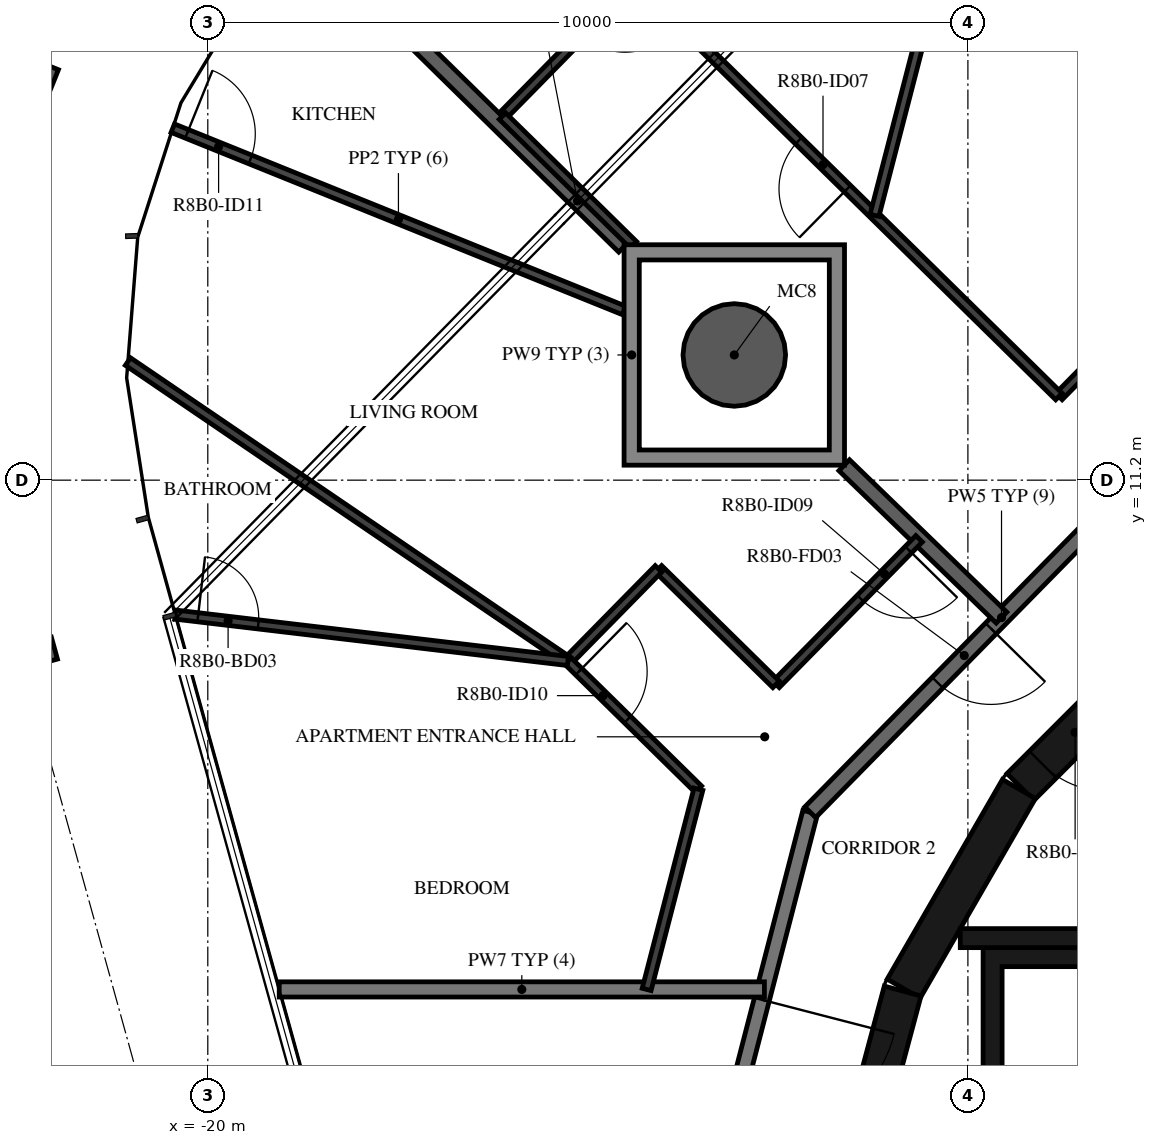
"""IFC4 building model, lengths in metres.
Left out: names, types, materials, properties, quantities, classifications, styles, units other than length and angle.
Written with IfcOpenShell. Run it as: python <this file> out.ifc"""

import sys

from ifc_helpers import new_model, si_unit, direction, frame, frame_2d, origin, origin_2d, place, context, subcontext, project, spatial, polyline, rectangle, hollow_circle, i_section, outline, extrude, element, fill, save


model = new_model("IFC4")
c1 = context("Model", 3, precision=1e-05, world=origin(), true_north=direction((0.0, 1.0)))
c2 = subcontext(c1, "Body", "Model", "MODEL_VIEW")
j1 = project(units=[si_unit("LENGTHUNIT", "METRE"), si_unit("PLANEANGLEUNIT", "RADIAN")], contexts=[c1])
p1 = place(None, origin())
s1 = spatial("IfcSite", under=j1, at=p1, CompositionType="ELEMENT")
p2 = place(p1, origin())
s2 = spatial("IfcBuilding", under=s1, at=p2, CompositionType="ELEMENT")
p3 = place(p2, frame((0.0, 0.0, 312.2)))
s3 = spatial("IfcBuildingStorey", under=s2, at=p3, CompositionType="ELEMENT", Elevation=312.2)
p4 = place(p3, frame((-13.073, 12.847, -0.38), z_axis=(0.0, 0.0, 1.0), x_axis=(1.0, 0.0, 0.0)))
e1 = element("IfcColumn", 1, at=p4, inside=s3, PredefinedType="COLUMN", context=c2, shape_type="SweptSolid", body=[
    extrude(hollow_circle(Radius=0.675, WallThickness=0.03, at=origin_2d()), origin(), (0.0, 0.0, 1.0), 3.5),
])
for number, where, z_axis, x_axis in (
    (2, (-22.438, 16.629, -0.38), (0.0, 0.0, 1.0), (0.374, 0.927, 0.0)),
    (3, (-22.452, 8.87, -0.38), (0.0, 0.0, 1.0), (-0.267, 0.964, 0.0)),
):
    element("IfcColumn", number, at=place(p3, frame(where, z_axis=z_axis, x_axis=x_axis)), inside=s3, PredefinedType="COLUMN", context=c2, shape_type="SweptSolid", body=[
        extrude(i_section(OverallWidth=0.3, OverallDepth=0.9, WebThickness=0.019, FlangeThickness=0.035, FilletRadius=0.03, at=origin_2d()), origin(), (0.0, 0.0, 1.0), 3.5),
    ])
p5 = place(p3, frame((-7.164, 9.308, 0.0), z_axis=(0.0, 0.0, 1.0), x_axis=(-0.707106781187, -0.707106781187, 0.0)))
e4 = element("IfcWall", 4, at=p5, inside=s3, PredefinedType="SHEAR", context=c2, shape_type="SweptSolid", body=[
    extrude(rectangle(XDim=3.032, YDim=0.5, at=frame_2d((1.516, 0.0))), origin(), (0.0, 0.0, 1.0), 3.12),
])
p6 = place(p5, frame((1.416, 0.0, 0.0)))
e5 = element("IfcOpeningElement", 5, at=p6, cuts=e4, PredefinedType="OPENING", context=c2, shape_type="SweptSolid", body=[
    extrude(rectangle(XDim=1.2, YDim=2.1, at=frame_2d((0.6, 1.05))), frame((0.0, 0.26, 0.0), z_axis=(0.0, -1.0, 0.0), x_axis=(1.0, 0.0, 0.0)), (0.0, 0.0, 1.0), 0.52),
])
for number, where, z_axis, x_axis in (
    (6, (-9.329, 7.137, 0.0), (0.0, 0.0, 1.0), (-0.5, -0.866, 0.0)),
    (7, (-10.858, 4.479, 0.0), (0.0, 0.0, 1.0), (-0.259, -0.966, 0.0)),
):
    element("IfcWall", number, at=place(p3, frame(where, z_axis=z_axis, x_axis=x_axis)), inside=s3, PredefinedType="SHEAR", context=c2, shape_type="SweptSolid", body=[
        extrude(rectangle(XDim=3.033, YDim=0.5, at=frame_2d((1.516, 0.0))), origin(), (0.0, 0.0, 1.0), 3.12),
    ])
p7 = place(p3, frame((-7.0, 5.175, 0.0), z_axis=(0.0, 0.0, 1.0), x_axis=(-1.0, 0.0, 0.0)))
e8 = element("IfcWall", 8, at=p7, inside=s3, PredefinedType="SHEAR", context=c2, shape_type="SweptSolid", body=[
    extrude(rectangle(XDim=3.1, YDim=0.25, at=frame_2d((1.55, 0.0))), origin(), (0.0, 0.0, 1.0), 3.12),
])
p8 = place(p3, origin())
e9 = element("IfcWall", 9, at=p8, inside=s3, PredefinedType="SHEAR", context=c2, shape_type="SweptSolid", body=[
    extrude(outline(polyline([(-9.8, 1.9), (-9.55, 1.9), (-9.55, 4.8), (3.1, 4.8), (3.1, 1.9), (3.35, 1.9), (3.35, 4.8), (5.25, 4.8), (5.25, 1.9), (5.5, 1.9), (5.5, 4.8), (7.4, 4.8), (7.4, 1.9), (7.65, 1.9), (7.65, 4.8), (9.55, 4.8), (9.55, 1.9), (9.8, 1.9), (9.8, 4.8), (9.8, 5.05), (-9.8, 5.05), (-9.8, 4.8), (-9.8, 1.9)])), origin(), (0.0, 0.0, 1.0), 3.12),
])
p9 = place(p3, frame((-12.074, 6.831, 0.0), z_axis=(0.0, 0.0, 1.0), x_axis=(-0.250391063186, -0.968144780225, 0.0)))
e10 = element("IfcWall", 10, at=p9, inside=s3, PredefinedType="STANDARD", context=c2, shape_type="SweptSolid", body=[
    extrude(rectangle(XDim=7.181, YDim=0.2, at=frame_2d((3.591, 0.0))), origin(), (0.0, 0.0, 1.0), 3.12),
])
p10 = place(p9, frame((2.548, 0.0, 0.0)))
e11 = element("IfcOpeningElement", 11, at=p10, cuts=e10, PredefinedType="OPENING", context=c2, shape_type="SweptSolid", body=[
    extrude(rectangle(XDim=1.8, YDim=2.1, at=frame_2d((0.9, 1.05))), frame((0.0, 0.11, 0.0), z_axis=(0.0, -1.0, 0.0), x_axis=(1.0, 0.0, 0.0)), (0.0, 0.0, 1.0), 0.22),
])
p11 = place(p3, frame((-7.041, 11.953, 0.0), z_axis=(0.0, 0.0, 1.0), x_axis=(-0.70090916255, -0.713250549143, 0.0)))
e12 = element("IfcWall", 12, at=p11, inside=s3, PredefinedType="STANDARD", context=c2, shape_type="SweptSolid", body=[
    extrude(rectangle(XDim=7.181, YDim=0.2, at=frame_2d((3.59, 0.0))), origin(), (0.0, 0.0, 1.0), 3.12),
])
p12 = place(p11, frame((3.791, 0.0, 0.0)))
e13 = element("IfcOpeningElement", 13, at=p12, cuts=e12, PredefinedType="OPENING", context=c2, shape_type="SweptSolid", body=[
    extrude(rectangle(XDim=1.0, YDim=2.1, at=frame_2d((0.5, 1.05))), frame((0.0, 0.11, 0.0), z_axis=(0.0, -1.0, 0.0), x_axis=(1.0, 0.0, 0.0)), (0.0, 0.0, 1.0), 0.22),
])
p13 = place(p3, frame((-12.677, 4.5, 0.0), z_axis=(0.0, 0.0, 1.0), x_axis=(-1.0, 0.0, 0.0)))
e14 = element("IfcWall", 14, at=p13, inside=s3, PredefinedType="STANDARD", context=c2, shape_type="SweptSolid", body=[
    extrude(rectangle(XDim=6.383, YDim=0.2, at=frame_2d((3.192, 0.0))), origin(), (0.0, 0.0, 1.0), 3.12),
])
p14 = place(p3, frame((-11.627, 11.396, 0.0), z_axis=(0.0, 0.0, 1.0), x_axis=(0.718328882961, -0.695703683981, 0.0)))
e15 = element("IfcWall", 15, at=p14, inside=s3, PredefinedType="STANDARD", context=c2, shape_type="SweptSolid", body=[
    extrude(rectangle(XDim=2.881, YDim=0.2, at=frame_2d((1.44, 0.0))), origin(), (0.0, 0.0, 1.0), 3.12),
])
p15 = place(p3, frame((-18.741, 18.417, 0.0), z_axis=(0.0, 0.0, 1.0), x_axis=(0.713252414586, -0.700907264256, 0.0)))
e16 = element("IfcWall", 16, at=p15, inside=s3, PredefinedType="STANDARD", context=c2, shape_type="SweptSolid", body=[
    extrude(rectangle(XDim=5.913, YDim=0.2, at=frame_2d((2.957, 0.0))), origin(), (0.0, 0.0, 1.0), 3.12),
])
p16 = place(p3, frame((-7.829, 13.291, 0.0), z_axis=(0.0, 0.0, 1.0), x_axis=(-0.700840583087, -0.713317935494, 0.0)))
e17 = element("IfcWall", 17, at=p16, inside=s3, PredefinedType="PARTITIONING", context=c2, shape_type="SweptSolid", body=[
    extrude(rectangle(XDim=1.389, YDim=0.12, at=frame_2d((0.695, 0.0))), origin(), (0.0, 0.0, 1.0), 3.12),
])
p17 = place(p3, frame((-8.803, 12.3, 0.0), z_axis=(0.0, 0.0, 1.0), x_axis=(-0.713240430861, 0.700919458844, 0.0)))
e18 = element("IfcWall", 18, at=p17, inside=s3, PredefinedType="PARTITIONING", context=c2, shape_type="SweptSolid", body=[
    extrude(rectangle(XDim=7.807, YDim=0.12, at=frame_2d((3.904, 0.0))), origin(), (0.0, 0.0, 1.0), 3.12),
])
p18 = place(p17, frame((3.901, 0.0, 0.0)))
e19 = element("IfcOpeningElement", 19, at=p18, cuts=e18, PredefinedType="OPENING", context=c2, shape_type="SweptSolid", body=[
    extrude(rectangle(XDim=0.9, YDim=2.1, at=frame_2d((0.45, 1.05))), frame((0.0, 0.07, 0.0), z_axis=(0.0, -1.0, 0.0), x_axis=(1.0, 0.0, 0.0)), (0.0, 0.0, 1.0), 0.14),
])
p19 = place(p3, frame((-14.371, 17.772, 0.0), z_axis=(0.0, 0.0, 1.0), x_axis=(-0.700928101034, -0.713231937859, 0.0)))
e20 = element("IfcWall", 20, at=p19, inside=s3, PredefinedType="PARTITIONING", context=c2, shape_type="SweptSolid", body=[
    extrude(rectangle(XDim=2.5, YDim=0.12, at=frame_2d((1.25, 0.0))), origin(), (0.0, 0.0, 1.0), 3.12),
])
p20 = place(p19, frame((0.2, 0.0, 0.0)))
e21 = element("IfcOpeningElement", 21, at=p20, cuts=e20, PredefinedType="OPENING", context=c2, shape_type="SweptSolid", body=[
    extrude(rectangle(XDim=0.8, YDim=2.1, at=frame_2d((0.4, 1.05))), frame((0.0, 0.07, 0.0), z_axis=(0.0, -1.0, 0.0), x_axis=(1.0, 0.0, 0.0)), (0.0, 0.0, 1.0), 0.14),
])
p21 = place(p3, frame((-16.124, 15.989, 0.0), z_axis=(0.0, 0.0, 1.0), x_axis=(0.713298294795, -0.700860572898, 0.0)))
e22 = element("IfcWall", 22, at=p21, inside=s3, PredefinedType="PARTITIONING", context=c2, shape_type="SweptSolid", body=[
    extrude(rectangle(XDim=2.414, YDim=0.12, at=frame_2d((1.207, 0.0))), origin(), (0.0, 0.0, 1.0), 3.12),
])
p22 = place(p3, frame((-9.787, 20.26, 0.0), z_axis=(0.0, 0.0, 1.0), x_axis=(-0.250397207818, -0.968143191019, 0.0)))
e23 = element("IfcWall", 23, at=p22, inside=s3, PredefinedType="PARTITIONING", context=c2, shape_type="SweptSolid", body=[
    extrude(rectangle(XDim=5.76, YDim=0.12, at=frame_2d((2.88, 0.0))), origin(), (0.0, 0.0, 1.0), 2.73),
])
p23 = place(p22, frame((0.2, 0.0, 0.0)))
e24 = element("IfcOpeningElement", 24, at=p23, cuts=e23, PredefinedType="OPENING", context=c2, shape_type="SweptSolid", body=[
    extrude(rectangle(XDim=0.9, YDim=2.1, at=frame_2d((0.45, 1.05))), frame((0.0, 0.07, 0.0), z_axis=(0.0, -1.0, 0.0), x_axis=(1.0, 0.0, 0.0)), (0.0, 0.0, 1.0), 0.14),
])
p24 = place(p3, frame((-10.642, 10.429, 0.0), z_axis=(0.0, 0.0, 1.0), x_axis=(-0.700897237058, -0.713262268092, 0.0)))
e25 = element("IfcWall", 25, at=p24, inside=s3, PredefinedType="PARTITIONING", context=c2, shape_type="SweptSolid", body=[
    extrude(rectangle(XDim=2.685, YDim=0.12, at=frame_2d((1.343, 0.0))), origin(), (0.0, 0.0, 1.0), 3.12),
])
p25 = place(p24, frame((0.2, 0.0, 0.0)))
e26 = element("IfcOpeningElement", 26, at=p25, cuts=e25, PredefinedType="OPENING", context=c2, shape_type="SweptSolid", body=[
    extrude(rectangle(XDim=0.9, YDim=2.1, at=frame_2d((0.45, 1.05))), frame((0.0, 0.07, 0.0), z_axis=(0.0, -1.0, 0.0), x_axis=(1.0, 0.0, 0.0)), (0.0, 0.0, 1.0), 0.14),
])
p26 = place(p3, frame((-12.524, 8.513, 0.0), z_axis=(0.0, 0.0, 1.0), x_axis=(-0.713272241211, 0.700887087852, 0.0)))
e27 = element("IfcWall", 27, at=p26, inside=s3, PredefinedType="PARTITIONING", context=c2, shape_type="SweptSolid", body=[
    extrude(rectangle(XDim=2.168, YDim=0.12, at=frame_2d((1.084, 0.0))), origin(), (0.0, 0.0, 1.0), 3.12),
])
p27 = place(p3, frame((-14.071, 10.033, 0.0), z_axis=(0.0, 0.0, 1.0), x_axis=(-0.700903812832, -0.713255806255, 0.0)))
e28 = element("IfcWall", 28, at=p27, inside=s3, PredefinedType="PARTITIONING", context=c2, shape_type="SweptSolid", body=[
    extrude(rectangle(XDim=1.7, YDim=0.12, at=frame_2d((0.85, 0.0))), origin(), (0.0, 0.0, 1.0), 3.12),
])
p28 = place(p3, frame((-15.262, 8.821, 0.0), z_axis=(0.0, 0.0, 1.0), x_axis=(0.713216332019, -0.700943980459, 0.0)))
e29 = element("IfcWall", 29, at=p28, inside=s3, PredefinedType="PARTITIONING", context=c2, shape_type="SweptSolid", body=[
    extrude(rectangle(XDim=2.407, YDim=0.12, at=frame_2d((1.204, 0.0))), origin(), (0.0, 0.0, 1.0), 3.12),
])
p29 = place(p28, frame((0.2, 0.0, 0.0)))
e30 = element("IfcOpeningElement", 30, at=p29, cuts=e29, PredefinedType="OPENING", context=c2, shape_type="SweptSolid", body=[
    extrude(rectangle(XDim=0.9, YDim=2.1, at=frame_2d((0.45, 1.05))), frame((0.0, 0.07, 0.0), z_axis=(0.0, -1.0, 0.0), x_axis=(1.0, 0.0, 0.0)), (0.0, 0.0, 1.0), 0.14),
])
p30 = place(p3, frame((-13.545, 7.134, 0.0), z_axis=(0.0, 0.0, 1.0), x_axis=(-0.250320452157, -0.968163039592, 0.0)))
e31 = element("IfcWall", 31, at=p30, inside=s3, PredefinedType="PARTITIONING", context=c2, shape_type="SweptSolid", body=[
    extrude(rectangle(XDim=2.72, YDim=0.12, at=frame_2d((1.36, 0.0))), origin(), (0.0, 0.0, 1.0), 3.12),
])
p31 = place(p3, frame((-20.46, 15.831, 0.0), z_axis=(0.0, 0.0, 1.0), x_axis=(0.927230380144, -0.374491417977, 0.0)))
e32 = element("IfcWall", 32, at=p31, inside=s3, PredefinedType="PARTITIONING", context=c2, shape_type="SweptSolid", body=[
    extrude(rectangle(XDim=6.403, YDim=0.12, at=frame_2d((3.202, 0.0))), origin(), (0.0, 0.0, 1.0), 2.73),
])
p32 = place(p31, frame((0.2, 0.0, 0.0)))
e33 = element("IfcOpeningElement", 33, at=p32, cuts=e32, PredefinedType="OPENING", context=c2, shape_type="SweptSolid", body=[
    extrude(rectangle(XDim=0.9, YDim=2.1, at=frame_2d((0.45, 1.05))), frame((0.0, 0.07, 0.0), z_axis=(0.0, -1.0, 0.0), x_axis=(1.0, 0.0, 0.0)), (0.0, 0.0, 1.0), 0.14),
])
p33 = place(p3, frame((-21.051, 12.76, 0.0), z_axis=(0.0, 0.0, 1.0), x_axis=(0.826728647395, -0.562600874134, 0.0)))
e34 = element("IfcWall", 34, at=p33, inside=s3, PredefinedType="PARTITIONING", context=c2, shape_type="SweptSolid", body=[
    extrude(rectangle(XDim=7.002, YDim=0.12, at=frame_2d((3.501, 0.0))), origin(), (0.0, 0.0, 1.0), 3.12),
])
p34 = place(p3, frame((-20.428, 9.431, 0.0), z_axis=(0.0, 0.0, 1.0), x_axis=(0.993086702471, -0.117383139226, 0.0)))
e35 = element("IfcWall", 35, at=p34, inside=s3, PredefinedType="PARTITIONING", context=c2, shape_type="SweptSolid", body=[
    extrude(rectangle(XDim=5.202, YDim=0.12, at=frame_2d((2.601, 0.0))), origin(), (0.0, 0.0, 1.0), 3.12),
])
p35 = place(p34, frame((0.3, 0.0, 0.0)))
e36 = element("IfcOpeningElement", 36, at=p35, cuts=e35, PredefinedType="OPENING", context=c2, shape_type="SweptSolid", body=[
    extrude(rectangle(XDim=0.8, YDim=2.1, at=frame_2d((0.4, 1.05))), frame((0.0, 0.07, 0.0), z_axis=(0.0, -1.0, 0.0), x_axis=(1.0, 0.0, 0.0)), (0.0, 0.0, 1.0), 0.14),
])
p36 = place(p3, origin())
e37 = element("IfcWall", 37, at=p36, inside=s3, PredefinedType="STANDARD", context=c2, shape_type="SweptSolid", body=[
    extrude(outline(polyline([(-11.623, 14.297), (-11.623, 11.397), (-14.523, 11.397), (-14.523, 14.297), (-11.623, 14.297)]), holes=[polyline([(-14.323, 11.597), (-11.823, 11.597), (-11.823, 14.097), (-14.323, 14.097), (-14.323, 11.597)])]), origin(), (0.0, 0.0, 1.0), 3.12),
])
p37 = place(p6, origin())
e38 = element("IfcDoor", 38, at=p37, inside=s3, OperationType="SINGLE_SWING_RIGHT", PredefinedType="DOOR", context=c2, shape_type="SweptSolid", body=[
    extrude(rectangle(XDim=1.2, YDim=2.1, at=frame_2d((0.6, 1.05))), frame((0.0, 0.025, 0.0), z_axis=(0.0, -1.0, 0.0), x_axis=(1.0, 0.0, 0.0)), (0.0, 0.0, 1.0), 0.05),
])
fill(e5, e38)
p38 = place(p18, origin())
e39 = element("IfcDoor", 39, at=p38, inside=s3, OperationType="SINGLE_SWING_LEFT", PredefinedType="DOOR", context=c2, shape_type="SweptSolid", body=[
    extrude(rectangle(XDim=0.9, YDim=2.1, at=frame_2d((0.45, 1.05))), frame((0.0, 0.025, 0.0), z_axis=(0.0, -1.0, 0.0), x_axis=(1.0, 0.0, 0.0)), (0.0, 0.0, 1.0), 0.05),
])
fill(e19, e39)
p39 = place(p12, origin())
e40 = element("IfcDoor", 40, at=p39, inside=s3, OperationType="SINGLE_SWING_LEFT", PredefinedType="DOOR", context=c2, shape_type="SweptSolid", body=[
    extrude(rectangle(XDim=1.0, YDim=2.1, at=frame_2d((0.5, 1.05))), frame((0.0, 0.025, 0.0), z_axis=(0.0, -1.0, 0.0), x_axis=(1.0, 0.0, 0.0)), (0.0, 0.0, 1.0), 0.05),
])
fill(e13, e40)
p40 = place(p25, origin())
e41 = element("IfcDoor", 41, at=p40, inside=s3, OperationType="SINGLE_SWING_LEFT", PredefinedType="DOOR", context=c2, shape_type="SweptSolid", body=[
    extrude(rectangle(XDim=0.9, YDim=2.1, at=frame_2d((0.45, 1.05))), frame((0.0, 0.025, 0.0), z_axis=(0.0, -1.0, 0.0), x_axis=(1.0, 0.0, 0.0)), (0.0, 0.0, 1.0), 0.05),
])
fill(e26, e41)
p41 = place(p29, origin())
e42 = element("IfcDoor", 42, at=p41, inside=s3, OperationType="SINGLE_SWING_LEFT", PredefinedType="DOOR", context=c2, shape_type="SweptSolid", body=[
    extrude(rectangle(XDim=0.9, YDim=2.1, at=frame_2d((0.45, 1.05))), frame((0.0, 0.025, 0.0), z_axis=(0.0, -1.0, 0.0), x_axis=(1.0, 0.0, 0.0)), (0.0, 0.0, 1.0), 0.05),
])
fill(e30, e42)
p42 = place(p32, origin())
e43 = element("IfcDoor", 43, at=p42, inside=s3, OperationType="SINGLE_SWING_LEFT", PredefinedType="DOOR", context=c2, shape_type="SweptSolid", body=[
    extrude(rectangle(XDim=0.9, YDim=2.1, at=frame_2d((0.45, 1.05))), frame((0.0, 0.025, 0.0), z_axis=(0.0, -1.0, 0.0), x_axis=(1.0, 0.0, 0.0)), (0.0, 0.0, 1.0), 0.05),
])
fill(e33, e43)
p43 = place(p35, origin())
e44 = element("IfcDoor", 44, at=p43, inside=s3, OperationType="SINGLE_SWING_LEFT", PredefinedType="DOOR", context=c2, shape_type="SweptSolid", body=[
    extrude(rectangle(XDim=0.8, YDim=2.1, at=frame_2d((0.4, 1.05))), frame((0.0, 0.025, 0.0), z_axis=(0.0, -1.0, 0.0), x_axis=(1.0, 0.0, 0.0)), (0.0, 0.0, 1.0), 0.05),
])
fill(e36, e44)
p44 = place(p10, origin())
e45 = element("IfcDoor", 45, at=p44, inside=s3, OperationType="DOUBLE_DOOR_SINGLE_SWING", PredefinedType="DOOR", context=c2, shape_type="SweptSolid", body=[
    extrude(rectangle(XDim=1.8, YDim=2.1, at=frame_2d((0.9, 1.05))), frame((0.0, 0.025, 0.0), z_axis=(0.0, -1.0, 0.0), x_axis=(1.0, 0.0, 0.0)), (0.0, 0.0, 1.0), 0.05),
])
fill(e11, e45)
save(model, sys.argv[1])
